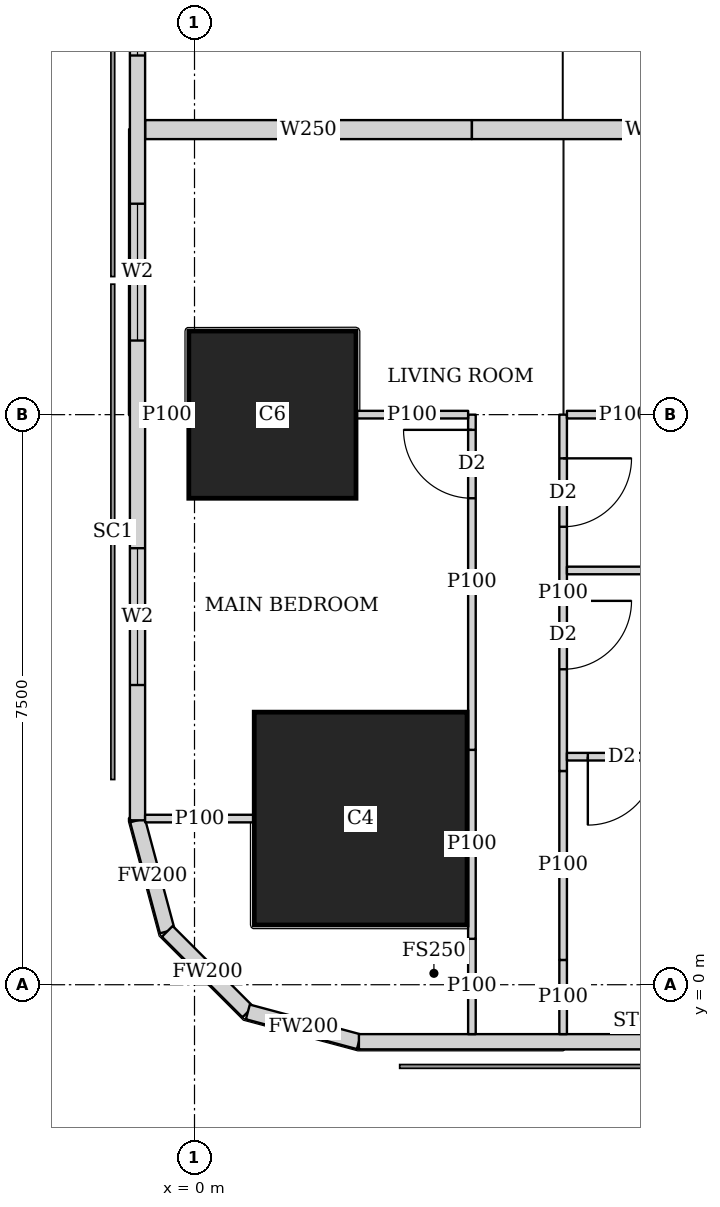
"""IFC4 building model, lengths in metres.
Left out: names, types, materials, properties, quantities, classifications, styles, units other than length and angle.
Written with IfcOpenShell. Run it as: python <this file> out.ifc"""

import sys

from ifc_helpers import new_model, si_unit, direction, frame, frame_2d, origin, origin_2d, place, context, subcontext, project, spatial, rectangle, extrude, element, fill, save


model = new_model("IFC4")
c1 = context("Model", 3, precision=1e-05, world=origin(), true_north=direction((0.0, 1.0)))
c2 = subcontext(c1, "Body", "Model", "MODEL_VIEW")
j1 = project(units=[si_unit("LENGTHUNIT", "METRE"), si_unit("PLANEANGLEUNIT", "RADIAN")], contexts=[c1])
p1 = place(None, origin())
s1 = spatial("IfcSite", under=j1, at=p1, CompositionType="ELEMENT")
p2 = place(p1, origin())
s2 = spatial("IfcBuilding", under=s1, at=p2, CompositionType="ELEMENT")
p3 = place(p2, frame((0.0, 0.0, 89.15)))
s3 = spatial("IfcBuildingStorey", under=s2, at=p3, CompositionType="ELEMENT", Elevation=89.15)
p4 = place(p3, frame((2.186, 2.186, 0.0), z_axis=(0.0, 0.0, 1.0), x_axis=(1.0, 0.0, 0.0)))
e1 = element("IfcColumn", 1, at=p4, inside=s3, PredefinedType="COLUMN", context=c2, shape_type="SweptSolid", body=[
    extrude(rectangle(XDim=2.8, YDim=2.8, at=origin_2d()), origin(), (0.0, 0.0, 1.0), 3.75),
])
p5 = place(p3, frame((1.025, 7.5, 0.0), z_axis=(0.0, 0.0, 1.0), x_axis=(1.0, 0.0, 0.0)))
e2 = element("IfcColumn", 2, at=p5, inside=s3, PredefinedType="COLUMN", context=c2, shape_type="SweptSolid", body=[
    extrude(rectangle(XDim=2.2, YDim=2.2, at=origin_2d()), origin(), (0.0, 0.0, 1.0), 3.75),
])
p6 = place(p3, frame((2.163, -0.75, 0.0), z_axis=(0.0, 0.0, 1.0), x_axis=(1.0, 0.0, 0.0)))
e3 = element("IfcWall", 3, at=p6, inside=s3, PredefinedType="SOLIDWALL", context=c2, shape_type="SweptSolid", body=[
    extrude(rectangle(XDim=45.628, YDim=0.2, at=frame_2d((22.814, 0.0))), origin(), (0.0, 0.0, 1.0), 3.5),
])
p7 = place(p6, frame((9.537, 0.0, 0.9)))
e4 = element("IfcOpeningElement", 4, at=p7, cuts=e3, PredefinedType="OPENING", context=c2, shape_type="SweptSolid", body=[
    extrude(rectangle(XDim=1.8, YDim=1.5, at=frame_2d((0.9, 0.75))), frame((0.0, 0.11, 0.0), z_axis=(0.0, -1.0, 0.0), x_axis=(1.0, 0.0, 0.0)), (0.0, 0.0, 1.0), 0.22),
])
p8 = place(p6, frame((13.137, 0.0, 0.9)))
e5 = element("IfcOpeningElement", 5, at=p8, cuts=e3, PredefinedType="OPENING", context=c2, shape_type="SweptSolid", body=[
    extrude(rectangle(XDim=1.8, YDim=1.5, at=frame_2d((0.9, 0.75))), frame((0.0, 0.11, 0.0), z_axis=(0.0, -1.0, 0.0), x_axis=(1.0, 0.0, 0.0)), (0.0, 0.0, 1.0), 0.22),
])
p9 = place(p6, frame((16.737, 0.0, 0.9)))
e6 = element("IfcOpeningElement", 6, at=p9, cuts=e3, PredefinedType="OPENING", context=c2, shape_type="SweptSolid", body=[
    extrude(rectangle(XDim=1.8, YDim=1.5, at=frame_2d((0.9, 0.75))), frame((0.0, 0.11, 0.0), z_axis=(0.0, -1.0, 0.0), x_axis=(1.0, 0.0, 0.0)), (0.0, 0.0, 1.0), 0.22),
])
p10 = place(p6, frame((20.337, 0.0, 0.9)))
e7 = element("IfcOpeningElement", 7, at=p10, cuts=e3, PredefinedType="OPENING", context=c2, shape_type="SweptSolid", body=[
    extrude(rectangle(XDim=1.8, YDim=1.5, at=frame_2d((0.9, 0.75))), frame((0.0, 0.11, 0.0), z_axis=(0.0, -1.0, 0.0), x_axis=(1.0, 0.0, 0.0)), (0.0, 0.0, 1.0), 0.22),
])
p11 = place(p6, frame((23.937, 0.0, 0.9)))
e8 = element("IfcOpeningElement", 8, at=p11, cuts=e3, PredefinedType="OPENING", context=c2, shape_type="SweptSolid", body=[
    extrude(rectangle(XDim=1.8, YDim=1.5, at=frame_2d((0.9, 0.75))), frame((0.0, 0.11, 0.0), z_axis=(0.0, -1.0, 0.0), x_axis=(1.0, 0.0, 0.0)), (0.0, 0.0, 1.0), 0.22),
])
p12 = place(p6, frame((27.537, 0.0, 0.9)))
e9 = element("IfcOpeningElement", 9, at=p12, cuts=e3, PredefinedType="OPENING", context=c2, shape_type="SweptSolid", body=[
    extrude(rectangle(XDim=1.8, YDim=1.5, at=frame_2d((0.9, 0.75))), frame((0.0, 0.11, 0.0), z_axis=(0.0, -1.0, 0.0), x_axis=(1.0, 0.0, 0.0)), (0.0, 0.0, 1.0), 0.22),
])
p13 = place(p6, frame((31.137, 0.0, 0.9)))
e10 = element("IfcOpeningElement", 10, at=p13, cuts=e3, PredefinedType="OPENING", context=c2, shape_type="SweptSolid", body=[
    extrude(rectangle(XDim=1.8, YDim=1.5, at=frame_2d((0.9, 0.75))), frame((0.0, 0.11, 0.0), z_axis=(0.0, -1.0, 0.0), x_axis=(1.0, 0.0, 0.0)), (0.0, 0.0, 1.0), 0.22),
])
p14 = place(p6, frame((34.737, 0.0, 0.9)))
e11 = element("IfcOpeningElement", 11, at=p14, cuts=e3, PredefinedType="OPENING", context=c2, shape_type="SweptSolid", body=[
    extrude(rectangle(XDim=1.8, YDim=1.5, at=frame_2d((0.9, 0.75))), frame((0.0, 0.11, 0.0), z_axis=(0.0, -1.0, 0.0), x_axis=(1.0, 0.0, 0.0)), (0.0, 0.0, 1.0), 0.22),
])
p15 = place(p3, frame((-0.75, 42.837, 0.0), z_axis=(0.0, 0.0, 1.0), x_axis=(0.0, -1.0, 0.0)))
e12 = element("IfcWall", 12, at=p15, inside=s3, PredefinedType="SOLIDWALL", context=c2, shape_type="SweptSolid", body=[
    extrude(rectangle(XDim=40.674, YDim=0.2, at=frame_2d((20.337, 0.0))), origin(), (0.0, 0.0, 1.0), 3.5),
])
p16 = place(p15, frame((1.78, 0.0, 0.9)))
e13 = element("IfcOpeningElement", 13, at=p16, cuts=e12, PredefinedType="OPENING", context=c2, shape_type="SweptSolid", body=[
    extrude(rectangle(XDim=1.8, YDim=1.5, at=frame_2d((0.9, 0.75))), frame((0.0, 0.11, 0.0), z_axis=(0.0, -1.0, 0.0), x_axis=(1.0, 0.0, 0.0)), (0.0, 0.0, 1.0), 0.22),
])
p17 = place(p15, frame((6.312, 0.0, 0.9)))
e14 = element("IfcOpeningElement", 14, at=p17, cuts=e12, PredefinedType="OPENING", context=c2, shape_type="SweptSolid", body=[
    extrude(rectangle(XDim=1.8, YDim=1.5, at=frame_2d((0.9, 0.75))), frame((0.0, 0.11, 0.0), z_axis=(0.0, -1.0, 0.0), x_axis=(1.0, 0.0, 0.0)), (0.0, 0.0, 1.0), 0.22),
])
p18 = place(p15, frame((10.062, 0.0, 0.9)))
e15 = element("IfcOpeningElement", 15, at=p18, cuts=e12, PredefinedType="OPENING", context=c2, shape_type="SweptSolid", body=[
    extrude(rectangle(XDim=1.8, YDim=1.5, at=frame_2d((0.9, 0.75))), frame((0.0, 0.11, 0.0), z_axis=(0.0, -1.0, 0.0), x_axis=(1.0, 0.0, 0.0)), (0.0, 0.0, 1.0), 0.22),
])
p19 = place(p15, frame((13.812, 0.0, 0.9)))
e16 = element("IfcOpeningElement", 16, at=p19, cuts=e12, PredefinedType="OPENING", context=c2, shape_type="SweptSolid", body=[
    extrude(rectangle(XDim=1.8, YDim=1.5, at=frame_2d((0.9, 0.75))), frame((0.0, 0.11, 0.0), z_axis=(0.0, -1.0, 0.0), x_axis=(1.0, 0.0, 0.0)), (0.0, 0.0, 1.0), 0.22),
])
p20 = place(p15, frame((17.562, 0.0, 0.9)))
e17 = element("IfcOpeningElement", 17, at=p20, cuts=e12, PredefinedType="OPENING", context=c2, shape_type="SweptSolid", body=[
    extrude(rectangle(XDim=1.8, YDim=1.5, at=frame_2d((0.9, 0.75))), frame((0.0, 0.11, 0.0), z_axis=(0.0, -1.0, 0.0), x_axis=(1.0, 0.0, 0.0)), (0.0, 0.0, 1.0), 0.22),
])
p21 = place(p15, frame((21.312, 0.0, 0.9)))
e18 = element("IfcOpeningElement", 18, at=p21, cuts=e12, PredefinedType="OPENING", context=c2, shape_type="SweptSolid", body=[
    extrude(rectangle(XDim=1.8, YDim=1.5, at=frame_2d((0.9, 0.75))), frame((0.0, 0.11, 0.0), z_axis=(0.0, -1.0, 0.0), x_axis=(1.0, 0.0, 0.0)), (0.0, 0.0, 1.0), 0.22),
])
p22 = place(p15, frame((25.062, 0.0, 0.9)))
e19 = element("IfcOpeningElement", 19, at=p22, cuts=e12, PredefinedType="OPENING", context=c2, shape_type="SweptSolid", body=[
    extrude(rectangle(XDim=1.8, YDim=1.5, at=frame_2d((0.9, 0.75))), frame((0.0, 0.11, 0.0), z_axis=(0.0, -1.0, 0.0), x_axis=(1.0, 0.0, 0.0)), (0.0, 0.0, 1.0), 0.22),
])
p23 = place(p15, frame((28.812, 0.0, 0.9)))
e20 = element("IfcOpeningElement", 20, at=p23, cuts=e12, PredefinedType="OPENING", context=c2, shape_type="SweptSolid", body=[
    extrude(rectangle(XDim=1.8, YDim=1.5, at=frame_2d((0.9, 0.75))), frame((0.0, 0.11, 0.0), z_axis=(0.0, -1.0, 0.0), x_axis=(1.0, 0.0, 0.0)), (0.0, 0.0, 1.0), 0.22),
])
p24 = place(p15, frame((32.562, 0.0, 0.9)))
e21 = element("IfcOpeningElement", 21, at=p24, cuts=e12, PredefinedType="OPENING", context=c2, shape_type="SweptSolid", body=[
    extrude(rectangle(XDim=1.8, YDim=1.5, at=frame_2d((0.9, 0.75))), frame((0.0, 0.11, 0.0), z_axis=(0.0, -1.0, 0.0), x_axis=(1.0, 0.0, 0.0)), (0.0, 0.0, 1.0), 0.22),
])
p25 = place(p15, frame((37.094, 0.0, 0.9)))
e22 = element("IfcOpeningElement", 22, at=p25, cuts=e12, PredefinedType="OPENING", context=c2, shape_type="SweptSolid", body=[
    extrude(rectangle(XDim=1.8, YDim=1.5, at=frame_2d((0.9, 0.75))), frame((0.0, 0.11, 0.0), z_axis=(0.0, -1.0, 0.0), x_axis=(1.0, 0.0, 0.0)), (0.0, 0.0, 1.0), 0.22),
])
p26 = place(p3, frame((-0.75, 2.163, 0.0), z_axis=(0.0, 0.0, 1.0), x_axis=(0.259168954497, -0.965832000415, 0.0)))
e23 = element("IfcWall", 23, at=p26, inside=s3, PredefinedType="SOLIDWALL", context=c2, shape_type="SweptSolid", body=[
    extrude(rectangle(XDim=1.513, YDim=0.2, at=frame_2d((0.756, 0.0))), origin(), (0.0, 0.0, 1.0), 3.5),
])
p27 = place(p3, frame((-0.358, 0.702, 0.0), z_axis=(0.0, 0.0, 1.0), x_axis=(0.707106781187, -0.707106781187, 0.0)))
e24 = element("IfcWall", 24, at=p27, inside=s3, PredefinedType="SOLIDWALL", context=c2, shape_type="SweptSolid", body=[
    extrude(rectangle(XDim=1.499, YDim=0.2, at=frame_2d((0.75, 0.0))), origin(), (0.0, 0.0, 1.0), 3.5),
])
p28 = place(p3, frame((0.702, -0.358, 0.0), z_axis=(0.0, 0.0, 1.0), x_axis=(0.965832000415, -0.259168954497, 0.0)))
e25 = element("IfcWall", 25, at=p28, inside=s3, PredefinedType="SOLIDWALL", context=c2, shape_type="SweptSolid", body=[
    extrude(rectangle(XDim=1.513, YDim=0.2, at=frame_2d((0.756, 0.0))), origin(), (0.0, 0.0, 1.0), 3.5),
])
p29 = place(p3, frame((3.65, -0.65, 0.0), z_axis=(0.0, 0.0, 1.0), x_axis=(0.0, 1.0, 0.0)))
e26 = element("IfcWall", 26, at=p29, inside=s3, PredefinedType="PARTITIONING", context=c2, shape_type="SweptSolid", body=[
    extrude(rectangle(XDim=1.254, YDim=0.1, at=frame_2d((0.627, 0.0))), origin(), (0.0, 0.0, 1.0), 3.5),
])
p30 = place(p3, frame((3.65, 0.604, 0.0), z_axis=(0.0, 0.0, 1.0), x_axis=(0.0, 1.0, 0.0)))
e27 = element("IfcWall", 27, at=p30, inside=s3, PredefinedType="PARTITIONING", context=c2, shape_type="SweptSolid", body=[
    extrude(rectangle(XDim=2.486, YDim=0.1, at=frame_2d((1.243, 0.0))), origin(), (0.0, 0.0, 1.0), 2.05),
])
p31 = place(p3, frame((3.65, 3.09, 0.0), z_axis=(0.0, 0.0, 1.0), x_axis=(0.0, 1.0, 0.0)))
e28 = element("IfcWall", 28, at=p31, inside=s3, PredefinedType="PARTITIONING", context=c2, shape_type="SweptSolid", body=[
    extrude(rectangle(XDim=4.41, YDim=0.1, at=frame_2d((2.205, 0.0))), origin(), (0.0, 0.0, 1.0), 3.5),
])
p32 = place(p31, frame((3.31, 0.0, 0.0)))
e29 = element("IfcOpeningElement", 29, at=p32, cuts=e28, PredefinedType="OPENING", context=c2, shape_type="SweptSolid", body=[
    extrude(rectangle(XDim=0.9, YDim=2.1, at=frame_2d((0.45, 1.05))), frame((0.0, 0.06, 0.0), z_axis=(0.0, -1.0, 0.0), x_axis=(1.0, 0.0, 0.0)), (0.0, 0.0, 1.0), 0.12),
])
p33 = place(p3, frame((4.85, -0.65, 0.0), z_axis=(0.0, 0.0, 1.0), x_axis=(0.0, 1.0, 0.0)))
e30 = element("IfcWall", 30, at=p33, inside=s3, PredefinedType="PARTITIONING", context=c2, shape_type="SweptSolid", body=[
    extrude(rectangle(XDim=0.976, YDim=0.1, at=frame_2d((0.488, 0.0))), origin(), (0.0, 0.0, 1.0), 3.5),
])
p34 = place(p3, frame((4.85, 0.326, 0.0), z_axis=(0.0, 0.0, 1.0), x_axis=(0.0, 1.0, 0.0)))
e31 = element("IfcWall", 31, at=p34, inside=s3, PredefinedType="PARTITIONING", context=c2, shape_type="SweptSolid", body=[
    extrude(rectangle(XDim=2.486, YDim=0.1, at=frame_2d((1.243, 0.0))), origin(), (0.0, 0.0, 1.0), 2.05),
])
p35 = place(p3, frame((4.85, 2.812, 0.0), z_axis=(0.0, 0.0, 1.0), x_axis=(0.0, 1.0, 0.0)))
e32 = element("IfcWall", 32, at=p35, inside=s3, PredefinedType="PARTITIONING", context=c2, shape_type="SweptSolid", body=[
    extrude(rectangle(XDim=4.688, YDim=0.1, at=frame_2d((2.344, 0.0))), origin(), (0.0, 0.0, 1.0), 3.5),
])
p36 = place(p35, frame((3.213, 0.0, 0.0)))
e33 = element("IfcOpeningElement", 33, at=p36, cuts=e32, PredefinedType="OPENING", context=c2, shape_type="SweptSolid", body=[
    extrude(rectangle(XDim=0.9, YDim=2.1, at=frame_2d((0.45, 1.05))), frame((0.0, 0.06, 0.0), z_axis=(0.0, -1.0, 0.0), x_axis=(1.0, 0.0, 0.0)), (0.0, 0.0, 1.0), 0.12),
])
p37 = place(p35, frame((1.338, 0.0, 0.0)))
e34 = element("IfcOpeningElement", 34, at=p37, cuts=e32, PredefinedType="OPENING", context=c2, shape_type="SweptSolid", body=[
    extrude(rectangle(XDim=0.9, YDim=2.1, at=frame_2d((0.45, 1.05))), frame((0.0, 0.06, 0.0), z_axis=(0.0, -1.0, 0.0), x_axis=(1.0, 0.0, 0.0)), (0.0, 0.0, 1.0), 0.12),
])
p38 = place(p3, frame((-0.65, 2.186, 0.0), z_axis=(0.0, 0.0, 1.0), x_axis=(1.0, 0.0, 0.0)))
e35 = element("IfcWall", 35, at=p38, inside=s3, PredefinedType="PARTITIONING", context=c2, shape_type="SweptSolid", body=[
    extrude(rectangle(XDim=1.435, YDim=0.1, at=frame_2d((0.717, 0.0))), origin(), (0.0, 0.0, 1.0), 3.5),
])
p39 = place(p3, frame((-0.65, 7.5, 0.0), z_axis=(0.0, 0.0, 1.0), x_axis=(1.0, 0.0, 0.0)))
e36 = element("IfcWall", 36, at=p39, inside=s3, PredefinedType="PARTITIONING", context=c2, shape_type="SweptSolid", body=[
    extrude(rectangle(XDim=0.574, YDim=0.1, at=frame_2d((0.287, 0.0))), origin(), (0.0, 0.0, 1.0), 2.05),
])
p40 = place(p3, frame((2.126, 7.5, 0.0), z_axis=(0.0, 0.0, 1.0), x_axis=(1.0, 0.0, 0.0)))
e37 = element("IfcWall", 37, at=p40, inside=s3, PredefinedType="PARTITIONING", context=c2, shape_type="SweptSolid", body=[
    extrude(rectangle(XDim=1.474, YDim=0.1, at=frame_2d((0.737, 0.0))), origin(), (0.0, 0.0, 1.0), 2.05),
])
p41 = place(p3, frame((4.9, 7.5, 0.0), z_axis=(0.0, 0.0, 1.0), x_axis=(1.0, 0.0, 0.0)))
e38 = element("IfcWall", 38, at=p41, inside=s3, PredefinedType="PARTITIONING", context=c2, shape_type="SweptSolid", body=[
    extrude(rectangle(XDim=1.499, YDim=0.1, at=frame_2d((0.75, 0.0))), origin(), (0.0, 0.0, 1.0), 3.5),
])
p42 = place(p3, frame((4.9, 5.45, 0.0), z_axis=(0.0, 0.0, 1.0), x_axis=(1.0, 0.0, 0.0)))
e39 = element("IfcWall", 39, at=p42, inside=s3, PredefinedType="PARTITIONING", context=c2, shape_type="SweptSolid", body=[
    extrude(rectangle(XDim=3.525, YDim=0.1, at=frame_2d((1.763, 0.0))), origin(), (0.0, 0.0, 1.0), 3.5),
])
p43 = place(p3, frame((-0.65, 11.25, 0.0), z_axis=(0.0, 0.0, 1.0), x_axis=(1.0, 0.0, 0.0)))
e40 = element("IfcWall", 40, at=p43, inside=s3, PredefinedType="SOLIDWALL", context=c2, shape_type="SweptSolid", body=[
    extrude(rectangle(XDim=4.3, YDim=0.25, at=frame_2d((2.15, 0.0))), origin(), (0.0, 0.0, 1.0), 2.2),
])
p44 = place(p3, frame((3.65, 11.25, 0.0), z_axis=(0.0, 0.0, 1.0), x_axis=(1.0, 0.0, 0.0)))
e41 = element("IfcWall", 41, at=p44, inside=s3, PredefinedType="SOLIDWALL", context=c2, shape_type="SweptSolid", body=[
    extrude(rectangle(XDim=4.775, YDim=0.25, at=frame_2d((2.388, 0.0))), origin(), (0.0, 0.0, 1.0), 3.5),
])
p45 = place(p3, frame((8.425, 3.0, 0.0), z_axis=(0.0, 0.0, 1.0), x_axis=(-1.0, 0.0, 0.0)))
e42 = element("IfcWall", 42, at=p45, inside=s3, PredefinedType="PARTITIONING", context=c2, shape_type="SweptSolid", body=[
    extrude(rectangle(XDim=3.525, YDim=0.1, at=frame_2d((1.763, 0.0))), origin(), (0.0, 0.0, 1.0), 3.5),
])
p46 = place(p45, frame((2.35, 0.0, 0.0)))
e43 = element("IfcOpeningElement", 43, at=p46, cuts=e42, PredefinedType="OPENING", context=c2, shape_type="SweptSolid", body=[
    extrude(rectangle(XDim=0.9, YDim=2.1, at=frame_2d((0.45, 1.05))), frame((0.0, 0.06, 0.0), z_axis=(0.0, -1.0, 0.0), x_axis=(1.0, 0.0, 0.0)), (0.0, 0.0, 1.0), 0.12),
])
p47 = place(p23, origin())
e44 = element("IfcWindow", 44, at=p47, inside=s3, PartitioningType="SINGLE_PANEL", PredefinedType="WINDOW", context=c2, shape_type="SweptSolid", body=[
    extrude(rectangle(XDim=1.8, YDim=1.5, at=frame_2d((0.9, 0.75))), frame((0.0, 0.03, 0.0), z_axis=(0.0, -1.0, 0.0), x_axis=(1.0, 0.0, 0.0)), (0.0, 0.0, 1.0), 0.06),
])
fill(e20, e44)
p48 = place(p24, origin())
e45 = element("IfcWindow", 45, at=p48, inside=s3, PartitioningType="SINGLE_PANEL", PredefinedType="WINDOW", context=c2, shape_type="SweptSolid", body=[
    extrude(rectangle(XDim=1.8, YDim=1.5, at=frame_2d((0.9, 0.75))), frame((0.0, 0.03, 0.0), z_axis=(0.0, -1.0, 0.0), x_axis=(1.0, 0.0, 0.0)), (0.0, 0.0, 1.0), 0.06),
])
fill(e21, e45)
p49 = place(p25, origin())
e46 = element("IfcWindow", 46, at=p49, inside=s3, PartitioningType="SINGLE_PANEL", PredefinedType="WINDOW", context=c2, shape_type="SweptSolid", body=[
    extrude(rectangle(XDim=1.8, YDim=1.5, at=frame_2d((0.9, 0.75))), frame((0.0, 0.03, 0.0), z_axis=(0.0, -1.0, 0.0), x_axis=(1.0, 0.0, 0.0)), (0.0, 0.0, 1.0), 0.06),
])
fill(e22, e46)
p50 = place(p32, origin())
e47 = element("IfcDoor", 47, at=p50, inside=s3, OperationType="SINGLE_SWING_RIGHT", PredefinedType="DOOR", context=c2, shape_type="SweptSolid", body=[
    extrude(rectangle(XDim=0.9, YDim=2.1, at=frame_2d((0.45, 1.05))), frame((0.0, 0.025, 0.0), z_axis=(0.0, -1.0, 0.0), x_axis=(1.0, 0.0, 0.0)), (0.0, 0.0, 1.0), 0.05),
])
fill(e29, e47)
p51 = place(p36, origin())
e48 = element("IfcDoor", 48, at=p51, inside=s3, OperationType="SINGLE_SWING_LEFT", PredefinedType="DOOR", context=c2, shape_type="SweptSolid", body=[
    extrude(rectangle(XDim=0.9, YDim=2.1, at=frame_2d((0.45, 1.05))), frame((0.0, 0.025, 0.0), z_axis=(0.0, -1.0, 0.0), x_axis=(1.0, 0.0, 0.0)), (0.0, 0.0, 1.0), 0.05),
])
fill(e33, e48)
p52 = place(p37, origin())
e49 = element("IfcDoor", 49, at=p52, inside=s3, OperationType="SINGLE_SWING_LEFT", PredefinedType="DOOR", context=c2, shape_type="SweptSolid", body=[
    extrude(rectangle(XDim=0.9, YDim=2.1, at=frame_2d((0.45, 1.05))), frame((0.0, 0.025, 0.0), z_axis=(0.0, -1.0, 0.0), x_axis=(1.0, 0.0, 0.0)), (0.0, 0.0, 1.0), 0.05),
])
fill(e34, e49)
p53 = place(p46, origin())
e50 = element("IfcDoor", 50, at=p53, inside=s3, OperationType="SINGLE_SWING_RIGHT", PredefinedType="DOOR", context=c2, shape_type="SweptSolid", body=[
    extrude(rectangle(XDim=0.9, YDim=2.1, at=frame_2d((0.45, 1.05))), frame((0.0, 0.025, 0.0), z_axis=(0.0, -1.0, 0.0), x_axis=(1.0, 0.0, 0.0)), (0.0, 0.0, 1.0), 0.05),
])
fill(e43, e50)
save(model, sys.argv[1])
